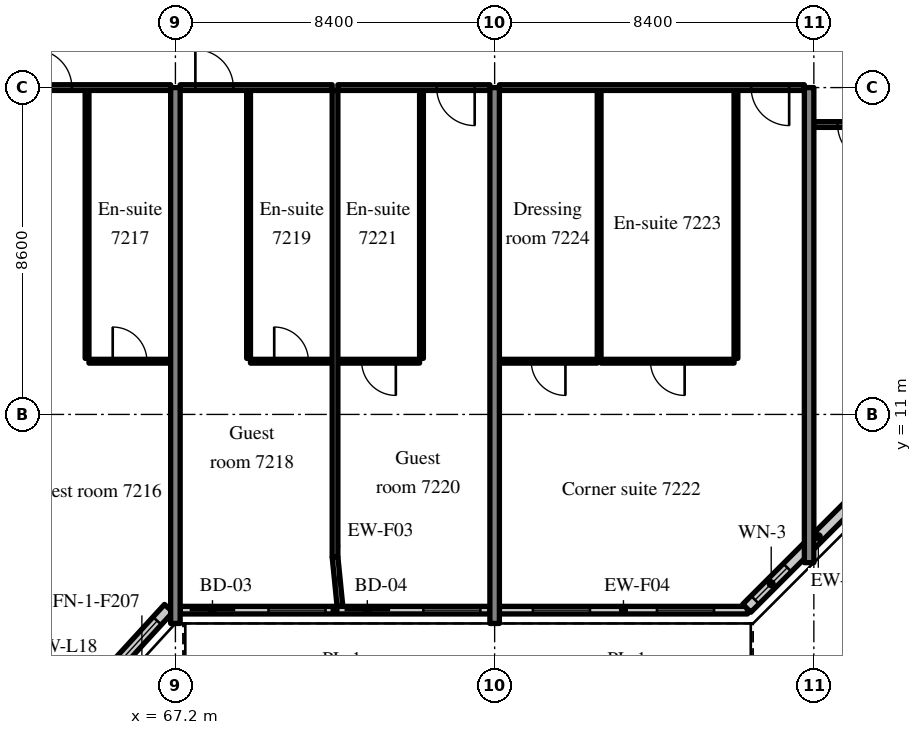
"""IFC4 building model, lengths in metres.
Left out: names, types, materials, properties, quantities, classifications, styles, units other than length and angle.
Written with IfcOpenShell. Run it as: python <this file> out.ifc"""

import sys

from ifc_helpers import new_model, si_unit, direction, frame, frame_2d, origin, place, context, subcontext, project, spatial, rectangle, extrude, source, transform, mapped, element, fill, save


model = new_model("IFC4")
c1 = context("Model", 3, precision=1e-05, world=origin(), true_north=direction((0.0, 1.0)))
c2 = subcontext(c1, "Body", "Model", "MODEL_VIEW")
j1 = project(units=[si_unit("LENGTHUNIT", "METRE"), si_unit("PLANEANGLEUNIT", "RADIAN")], contexts=[c1])
p1 = place(None, origin())
s1 = spatial("IfcSite", under=j1, at=p1, CompositionType="ELEMENT")
p2 = place(p1, origin())
s2 = spatial("IfcBuilding", under=s1, at=p2, CompositionType="ELEMENT")
p3 = place(p2, frame((0.0, 0.0, 301.7)))
s3 = spatial("IfcBuildingStorey", under=s2, at=p3, CompositionType="ELEMENT", Elevation=301.7)
m1 = source(origin(), c2, "Body", "SweptSolid", [
    extrude(rectangle(XDim=14.1, YDim=0.25, at=frame_2d((7.05, 0.0))), origin(), (0.0, 0.0, 1.0), 3.72),
])
for number, where, z_axis, x_axis in (
    (1, (67.2, 5.5, 0.0), (0.0, 0.0, 1.0), (0.0, 1.0, 0.0)),
    (2, (75.6, 5.5, 0.0), (0.0, 0.0, 1.0), (0.0, 1.0, 0.0)),
):
    element("IfcWall", number, at=place(p3, frame(where, z_axis=z_axis, x_axis=x_axis)), inside=s3, PredefinedType="SHEAR", context=c2, shape_type="MappedRepresentation", body=[
        mapped(m1, transform((0.0, 0.0, 0.0), scale=1.0)),
    ])
m2 = source(origin(), c2, "Body", "SweptSolid", [
    extrude(rectangle(XDim=12.5, YDim=0.25, at=frame_2d((6.25, 0.0))), origin(), (0.0, 0.0, 1.0), 3.72),
])
p4 = place(p3, frame((83.875, 7.1, 0.0), z_axis=(0.0, 0.0, 1.0), x_axis=(0.0, 1.0, 0.0)))
e3 = element("IfcWall", 3, at=p4, inside=s3, PredefinedType="SHEAR", context=c2, shape_type="MappedRepresentation", body=[
    mapped(m2, transform((0.0, 0.0, 0.0), scale=1.0)),
])
m3 = source(origin(), c2, "Body", "SweptSolid", [
    extrude(rectangle(XDim=2.398, YDim=0.3, at=frame_2d((1.199, 0.0))), origin(), (0.0, 0.0, 1.0), 3.72),
])
p5 = place(p3, frame((65.404, 4.131, 0.0), z_axis=(0.0, 0.0, 1.0), x_axis=(0.675374189419, 0.737475222815, 0.0)))
e4 = element("IfcWall", 4, at=p5, inside=s3, PredefinedType="SOLIDWALL", context=c2, shape_type="MappedRepresentation", body=[
    mapped(m3, transform((0.0, 0.0, 0.0), scale=1.0)),
])
m4 = source(origin(), c2, "Body", "SweptSolid", [
    extrude(rectangle(XDim=1.5, YDim=2.0, at=frame_2d((0.75, 1.0))), frame((0.0, 0.16, 0.0), z_axis=(0.0, -1.0, 0.0), x_axis=(1.0, 0.0, 0.0)), (0.0, 0.0, 1.0), 0.32),
])
p6 = place(p5, frame((0.449, 0.0, 0.9)))
e5 = element("IfcOpeningElement", 5, at=p6, cuts=e4, PredefinedType="OPENING", context=c2, shape_type="MappedRepresentation", body=[
    mapped(m4, transform((0.0, 0.0, 0.0), scale=1.0)),
])
m5 = source(origin(), c2, "Body", "SweptSolid", [
    extrude(rectangle(XDim=8.15, YDim=0.2, at=frame_2d((4.075, 0.0))), origin(), (0.0, 0.0, 1.0), 3.17),
])
p7 = place(p3, frame((67.325, 5.85, 0.0), z_axis=(0.0, 0.0, 1.0), x_axis=(1.0, 0.0, 0.0)))
e6 = element("IfcWall", 6, at=p7, inside=s3, PredefinedType="SOLIDWALL", context=c2, shape_type="MappedRepresentation", body=[
    mapped(m5, transform((0.0, 0.0, 0.0), scale=1.0)),
])
m6 = source(origin(), c2, "Body", "SweptSolid", [
    extrude(rectangle(XDim=1.2, YDim=2.4, at=frame_2d((0.6, 1.2))), frame((0.0, 0.11, 0.0), z_axis=(0.0, -1.0, 0.0), x_axis=(1.0, 0.0, 0.0)), (0.0, 0.0, 1.0), 0.22),
])
p8 = place(p7, frame((0.25, 0.0, 0.0)))
e7 = element("IfcOpeningElement", 7, at=p8, cuts=e6, PredefinedType="OPENING", context=c2, shape_type="MappedRepresentation", body=[
    mapped(m6, transform((0.0, 0.0, 0.0), scale=1.0)),
])
m7 = source(origin(), c2, "Body", "SweptSolid", [
    extrude(rectangle(XDim=1.5, YDim=1.5, at=frame_2d((0.75, 0.75))), frame((0.0, 0.11, 0.0), z_axis=(0.0, -1.0, 0.0), x_axis=(1.0, 0.0, 0.0)), (0.0, 0.0, 1.0), 0.22),
])
p9 = place(p7, frame((2.325, 0.0, 0.9)))
e8 = element("IfcOpeningElement", 8, at=p9, cuts=e6, PredefinedType="OPENING", context=c2, shape_type="MappedRepresentation", body=[
    mapped(m7, transform((0.0, 0.0, 0.0), scale=1.0)),
])
p10 = place(p7, frame((4.325, 0.0, 0.0)))
e9 = element("IfcOpeningElement", 9, at=p10, cuts=e6, PredefinedType="OPENING", context=c2, shape_type="MappedRepresentation", body=[
    mapped(m6, transform((0.0, 0.0, 0.0), scale=1.0)),
])
p11 = place(p7, frame((6.4, 0.0, 0.9)))
e10 = element("IfcOpeningElement", 10, at=p11, cuts=e6, PredefinedType="OPENING", context=c2, shape_type="MappedRepresentation", body=[
    mapped(m7, transform((0.0, 0.0, 0.0), scale=1.0)),
])
m8 = source(origin(), c2, "Body", "SweptSolid", [
    extrude(rectangle(XDim=6.53, YDim=0.2, at=frame_2d((3.265, 0.0))), origin(), (0.0, 0.0, 1.0), 3.17),
])
p12 = place(p3, frame((75.725, 5.85, 0.0), z_axis=(0.0, 0.0, 1.0), x_axis=(1.0, 0.0, 0.0)))
e11 = element("IfcWall", 11, at=p12, inside=s3, PredefinedType="SOLIDWALL", context=c2, shape_type="MappedRepresentation", body=[
    mapped(m8, transform((0.0, 0.0, 0.0), scale=1.0)),
])
p13 = place(p12, frame((0.883, 0.0, 0.9)))
e12 = element("IfcOpeningElement", 12, at=p13, cuts=e11, PredefinedType="OPENING", context=c2, shape_type="MappedRepresentation", body=[
    mapped(m7, transform((0.0, 0.0, 0.0), scale=1.0)),
])
p14 = place(p12, frame((4.147, 0.0, 0.9)))
e13 = element("IfcOpeningElement", 13, at=p14, cuts=e11, PredefinedType="OPENING", context=c2, shape_type="MappedRepresentation", body=[
    mapped(m7, transform((0.0, 0.0, 0.0), scale=1.0)),
])
m9 = source(origin(), c2, "Body", "SweptSolid", [
    extrude(rectangle(XDim=5.326, YDim=0.3, at=frame_2d((2.663, 0.0))), origin(), (0.0, 0.0, 1.0), 3.72),
])
p15 = place(p3, frame((82.234, 5.9, 0.0), z_axis=(0.0, 0.0, 1.0), x_axis=(0.707083859269, 0.707129702361, 0.0)))
e14 = element("IfcWall", 14, at=p15, inside=s3, PredefinedType="SOLIDWALL", context=c2, shape_type="MappedRepresentation", body=[
    mapped(m9, transform((0.0, 0.0, 0.0), scale=1.0)),
])
m10 = source(origin(), c2, "Body", "SweptSolid", [
    extrude(rectangle(XDim=1.2, YDim=1.5, at=frame_2d((0.6, 0.75))), frame((0.0, 0.16, 0.0), z_axis=(0.0, -1.0, 0.0), x_axis=(1.0, 0.0, 0.0)), (0.0, 0.0, 1.0), 0.32),
])
p16 = place(p15, frame((0.31, 0.0, 0.9)))
e15 = element("IfcOpeningElement", 15, at=p16, cuts=e14, PredefinedType="OPENING", context=c2, shape_type="MappedRepresentation", body=[
    mapped(m10, transform((0.0, 0.0, 0.0), scale=1.0)),
])
m11 = source(origin(), c2, "Body", "SweptSolid", [
    extrude(rectangle(XDim=7.05, YDim=0.1, at=frame_2d((3.525, 0.0))), origin(), (0.0, 0.0, 1.0), 3.72),
])
p17 = place(p3, frame((64.875, 12.475, 0.0), z_axis=(0.0, 0.0, 1.0), x_axis=(0.0, 1.0, 0.0)))
e16 = element("IfcWall", 16, at=p17, inside=s3, PredefinedType="PARTITIONING", context=c2, shape_type="MappedRepresentation", body=[
    mapped(m11, transform((0.0, 0.0, 0.0), scale=1.0)),
])
m12 = source(origin(), c2, "Body", "SweptSolid", [
    extrude(rectangle(XDim=2.15, YDim=0.1, at=frame_2d((1.075, 0.0))), origin(), (0.0, 0.0, 1.0), 3.72),
])
p18 = place(p3, frame((64.925, 12.4, 0.0), z_axis=(0.0, 0.0, 1.0), x_axis=(1.0, 0.0, 0.0)))
e17 = element("IfcWall", 17, at=p18, inside=s3, PredefinedType="PARTITIONING", context=c2, shape_type="MappedRepresentation", body=[
    mapped(m12, transform((0.0, 0.0, 0.0), scale=1.0)),
])
m13 = source(origin(), c2, "Body", "SweptSolid", [
    extrude(rectangle(XDim=0.9, YDim=2.1, at=frame_2d((0.45, 1.05))), frame((0.0, 0.06, 0.0), z_axis=(0.0, -1.0, 0.0), x_axis=(1.0, 0.0, 0.0)), (0.0, 0.0, 1.0), 0.12),
])
p19 = place(p18, frame((0.625, 0.0, 0.0)))
e18 = element("IfcOpeningElement", 18, at=p19, cuts=e17, PredefinedType="OPENING", context=c2, shape_type="MappedRepresentation", body=[
    mapped(m13, transform((0.0, 0.0, 0.0), scale=1.0)),
])
m14 = source(origin(), c2, "Body", "SweptSolid", [
    extrude(rectangle(XDim=4.0, YDim=0.15, at=frame_2d((2.0, 0.0))), origin(), (0.0, 0.0, 1.0), 3.02),
])
p20 = place(p3, frame((63.075, 19.6, 0.0), z_axis=(0.0, 0.0, 1.0), x_axis=(1.0, 0.0, 0.0)))
e19 = element("IfcWall", 19, at=p20, inside=s3, PredefinedType="PARTITIONING", context=c2, shape_type="MappedRepresentation", body=[
    mapped(m14, transform((0.0, 0.0, 0.0), scale=1.0)),
])
m15 = source(origin(), c2, "Body", "SweptSolid", [
    extrude(rectangle(XDim=1.0, YDim=2.1, at=frame_2d((0.5, 1.05))), frame((0.0, 0.085, 0.0), z_axis=(0.0, -1.0, 0.0), x_axis=(1.0, 0.0, 0.0)), (0.0, 0.0, 1.0), 0.17),
])
p21 = place(p20, frame((0.4, 0.0, 0.0)))
e20 = element("IfcOpeningElement", 20, at=p21, cuts=e19, PredefinedType="OPENING", context=c2, shape_type="MappedRepresentation", body=[
    mapped(m15, transform((0.0, 0.0, 0.0), scale=1.0)),
])
p22 = place(p3, frame((69.125, 12.475, 0.0), z_axis=(0.0, 0.0, 1.0), x_axis=(0.0, 1.0, 0.0)))
e21 = element("IfcWall", 21, at=p22, inside=s3, PredefinedType="PARTITIONING", context=c2, shape_type="MappedRepresentation", body=[
    mapped(m11, transform((0.0, 0.0, 0.0), scale=1.0)),
])
p23 = place(p3, frame((69.175, 12.4, 0.0), z_axis=(0.0, 0.0, 1.0), x_axis=(1.0, 0.0, 0.0)))
e22 = element("IfcWall", 22, at=p23, inside=s3, PredefinedType="PARTITIONING", context=c2, shape_type="MappedRepresentation", body=[
    mapped(m12, transform((0.0, 0.0, 0.0), scale=1.0)),
])
p24 = place(p23, frame((0.625, 0.0, 0.0)))
e23 = element("IfcOpeningElement", 23, at=p24, cuts=e22, PredefinedType="OPENING", context=c2, shape_type="MappedRepresentation", body=[
    mapped(m13, transform((0.0, 0.0, 0.0), scale=1.0)),
])
p25 = place(p3, frame((67.325, 19.6, 0.0), z_axis=(0.0, 0.0, 1.0), x_axis=(1.0, 0.0, 0.0)))
e24 = element("IfcWall", 24, at=p25, inside=s3, PredefinedType="PARTITIONING", context=c2, shape_type="MappedRepresentation", body=[
    mapped(m14, transform((0.0, 0.0, 0.0), scale=1.0)),
])
p26 = place(p25, frame((0.4, 0.0, 0.0)))
e25 = element("IfcOpeningElement", 25, at=p26, cuts=e24, PredefinedType="OPENING", context=c2, shape_type="MappedRepresentation", body=[
    mapped(m15, transform((0.0, 0.0, 0.0), scale=1.0)),
])
p27 = place(p3, frame((73.675, 12.475, 0.0), z_axis=(0.0, 0.0, 1.0), x_axis=(0.0, 1.0, 0.0)))
e26 = element("IfcWall", 26, at=p27, inside=s3, PredefinedType="PARTITIONING", context=c2, shape_type="MappedRepresentation", body=[
    mapped(m11, transform((0.0, 0.0, 0.0), scale=1.0)),
])
p28 = place(p3, frame((71.475, 12.4, 0.0), z_axis=(0.0, 0.0, 1.0), x_axis=(1.0, 0.0, 0.0)))
e27 = element("IfcWall", 27, at=p28, inside=s3, PredefinedType="PARTITIONING", context=c2, shape_type="MappedRepresentation", body=[
    mapped(m12, transform((0.0, 0.0, 0.0), scale=1.0)),
])
p29 = place(p28, frame((0.625, 0.0, 0.0)))
e28 = element("IfcOpeningElement", 28, at=p29, cuts=e27, PredefinedType="OPENING", context=c2, shape_type="MappedRepresentation", body=[
    mapped(m13, transform((0.0, 0.0, 0.0), scale=1.0)),
])
p30 = place(p3, frame((71.475, 19.6, 0.0), z_axis=(0.0, 0.0, 1.0), x_axis=(1.0, 0.0, 0.0)))
e29 = element("IfcWall", 29, at=p30, inside=s3, PredefinedType="PARTITIONING", context=c2, shape_type="MappedRepresentation", body=[
    mapped(m14, transform((0.0, 0.0, 0.0), scale=1.0)),
])
p31 = place(p30, frame((2.6, 0.0, 0.0)))
e30 = element("IfcOpeningElement", 30, at=p31, cuts=e29, PredefinedType="OPENING", context=c2, shape_type="MappedRepresentation", body=[
    mapped(m15, transform((0.0, 0.0, 0.0), scale=1.0)),
])
m16 = source(origin(), c2, "Body", "SweptSolid", [
    extrude(rectangle(XDim=12.275, YDim=0.15, at=frame_2d((6.137, 0.0))), origin(), (0.0, 0.0, 1.0), 3.72),
])
p32 = place(p3, frame((71.4, 7.25, 0.0), z_axis=(0.0, 0.0, 1.0), x_axis=(0.0, 1.0, 0.0)))
e31 = element("IfcWall", 31, at=p32, inside=s3, PredefinedType="PARTITIONING", context=c2, shape_type="MappedRepresentation", body=[
    mapped(m16, transform((0.0, 0.0, 0.0), scale=1.0)),
])
for number, where, z_axis, x_axis in (
    (32, (81.95, 12.475, 0.0), (0.0, 0.0, 1.0), (0.0, 1.0, 0.0)),
    (33, (78.35, 12.475, 0.0), (0.0, 0.0, 1.0), (0.0, 1.0, 0.0)),
):
    element("IfcWall", number, at=place(p3, frame(where, z_axis=z_axis, x_axis=x_axis)), inside=s3, PredefinedType="PARTITIONING", context=c2, shape_type="MappedRepresentation", body=[
        mapped(m11, transform((0.0, 0.0, 0.0), scale=1.0)),
    ])
m17 = source(origin(), c2, "Body", "SweptSolid", [
    extrude(rectangle(XDim=3.5, YDim=0.1, at=frame_2d((1.75, 0.0))), origin(), (0.0, 0.0, 1.0), 3.72),
])
p33 = place(p3, frame((78.4, 12.4, 0.0), z_axis=(0.0, 0.0, 1.0), x_axis=(1.0, 0.0, 0.0)))
e34 = element("IfcWall", 34, at=p33, inside=s3, PredefinedType="PARTITIONING", context=c2, shape_type="MappedRepresentation", body=[
    mapped(m17, transform((0.0, 0.0, 0.0), scale=1.0)),
])
p34 = place(p33, frame((1.3, 0.0, 0.0)))
e35 = element("IfcOpeningElement", 35, at=p34, cuts=e34, PredefinedType="OPENING", context=c2, shape_type="MappedRepresentation", body=[
    mapped(m13, transform((0.0, 0.0, 0.0), scale=1.0)),
])
m18 = source(origin(), c2, "Body", "SweptSolid", [
    extrude(rectangle(XDim=2.575, YDim=0.1, at=frame_2d((1.288, 0.0))), origin(), (0.0, 0.0, 1.0), 3.72),
])
p35 = place(p3, frame((75.725, 12.4, 0.0), z_axis=(0.0, 0.0, 1.0), x_axis=(1.0, 0.0, 0.0)))
e36 = element("IfcWall", 36, at=p35, inside=s3, PredefinedType="PARTITIONING", context=c2, shape_type="MappedRepresentation", body=[
    mapped(m18, transform((0.0, 0.0, 0.0), scale=1.0)),
])
p36 = place(p35, frame((0.838, 0.0, 0.0)))
e37 = element("IfcOpeningElement", 37, at=p36, cuts=e36, PredefinedType="OPENING", context=c2, shape_type="MappedRepresentation", body=[
    mapped(m13, transform((0.0, 0.0, 0.0), scale=1.0)),
])
m19 = source(origin(), c2, "Body", "SweptSolid", [
    extrude(rectangle(XDim=8.025, YDim=0.15, at=frame_2d((4.012, 0.0))), origin(), (0.0, 0.0, 1.0), 3.02),
])
p37 = place(p3, frame((75.725, 19.6, 0.0), z_axis=(0.0, 0.0, 1.0), x_axis=(1.0, 0.0, 0.0)))
e38 = element("IfcWall", 38, at=p37, inside=s3, PredefinedType="PARTITIONING", context=c2, shape_type="MappedRepresentation", body=[
    mapped(m19, transform((0.0, 0.0, 0.0), scale=1.0)),
])
p38 = place(p37, frame((6.625, 0.0, 0.0)))
e39 = element("IfcOpeningElement", 39, at=p38, cuts=e38, PredefinedType="OPENING", context=c2, shape_type="MappedRepresentation", body=[
    mapped(m15, transform((0.0, 0.0, 0.0), scale=1.0)),
])
m20 = source(origin(), c2, "Body", "SweptSolid", [
    extrude(rectangle(XDim=1.9, YDim=0.15, at=frame_2d((0.95, 0.0))), origin(), (0.0, 0.0, 1.0), 3.02),
])
p39 = place(p3, frame((84.0, 18.628, 0.0), z_axis=(0.0, 0.0, 1.0), x_axis=(1.0, 0.0, 0.0)))
e40 = element("IfcWall", 40, at=p39, inside=s3, PredefinedType="PARTITIONING", context=c2, shape_type="MappedRepresentation", body=[
    mapped(m20, transform((0.0, 0.0, 0.0), scale=1.0)),
])
p40 = place(p39, frame((0.625, 0.0, 0.0)))
e41 = element("IfcOpeningElement", 41, at=p40, cuts=e40, PredefinedType="OPENING", context=c2, shape_type="MappedRepresentation", body=[
    mapped(m15, transform((0.0, 0.0, 0.0), scale=1.0)),
])
m21 = source(origin(), c2, "Body", "SweptSolid", [
    extrude(rectangle(XDim=1.307, YDim=0.15, at=frame_2d((0.653, 0.0))), origin(), (0.0, 0.0, 1.0), 3.72),
])
p41 = place(p3, frame((71.53, 5.95, 0.0), z_axis=(0.0, 0.0, 1.0), x_axis=(-0.099596223396, 0.99502793543, 0.0)))
e42 = element("IfcWall", 42, at=p41, inside=s3, PredefinedType="PARTITIONING", context=c2, shape_type="MappedRepresentation", body=[
    mapped(m21, transform((0.0, 0.0, 0.0), scale=1.0)),
])
m22 = source(origin(), c2, "Body", "SweptSolid", [
    extrude(rectangle(XDim=1.5, YDim=2.0, at=frame_2d((0.75, 1.0))), frame((0.0, 0.03, 0.0), z_axis=(0.0, -1.0, 0.0), x_axis=(1.0, 0.0, 0.0)), (0.0, 0.0, 1.0), 0.06),
])
p42 = place(p6, origin())
e43 = element("IfcWindow", 43, at=p42, inside=s3, PartitioningType="SINGLE_PANEL", PredefinedType="WINDOW", context=c2, shape_type="MappedRepresentation", body=[
    mapped(m22, transform((0.0, 0.0, 0.0), scale=1.0)),
])
fill(e5, e43)
m23 = source(origin(), c2, "Body", "SweptSolid", [
    extrude(rectangle(XDim=1.2, YDim=2.4, at=frame_2d((0.6, 1.2))), frame((0.0, 0.025, 0.0), z_axis=(0.0, -1.0, 0.0), x_axis=(1.0, 0.0, 0.0)), (0.0, 0.0, 1.0), 0.05),
])
p43 = place(p8, origin())
e44 = element("IfcDoor", 44, at=p43, inside=s3, OperationType="SLIDING_TO_LEFT", PredefinedType="DOOR", context=c2, shape_type="MappedRepresentation", body=[
    mapped(m23, transform((0.0, 0.0, 0.0), scale=1.0)),
])
fill(e7, e44)
m24 = source(origin(), c2, "Body", "SweptSolid", [
    extrude(rectangle(XDim=1.5, YDim=1.5, at=frame_2d((0.75, 0.75))), frame((0.0, 0.03, 0.0), z_axis=(0.0, -1.0, 0.0), x_axis=(1.0, 0.0, 0.0)), (0.0, 0.0, 1.0), 0.06),
])
p44 = place(p9, origin())
e45 = element("IfcWindow", 45, at=p44, inside=s3, PartitioningType="SINGLE_PANEL", PredefinedType="WINDOW", context=c2, shape_type="MappedRepresentation", body=[
    mapped(m24, transform((0.0, 0.0, 0.0), scale=1.0)),
])
fill(e8, e45)
p45 = place(p10, origin())
e46 = element("IfcDoor", 46, at=p45, inside=s3, OperationType="SLIDING_TO_RIGHT", PredefinedType="DOOR", context=c2, shape_type="MappedRepresentation", body=[
    mapped(m23, transform((0.0, 0.0, 0.0), scale=1.0)),
])
fill(e9, e46)
p46 = place(p11, origin())
e47 = element("IfcWindow", 47, at=p46, inside=s3, PartitioningType="SINGLE_PANEL", PredefinedType="WINDOW", context=c2, shape_type="MappedRepresentation", body=[
    mapped(m24, transform((0.0, 0.0, 0.0), scale=1.0)),
])
fill(e10, e47)
p47 = place(p13, origin())
e48 = element("IfcWindow", 48, at=p47, inside=s3, PartitioningType="SINGLE_PANEL", PredefinedType="WINDOW", context=c2, shape_type="MappedRepresentation", body=[
    mapped(m24, transform((0.0, 0.0, 0.0), scale=1.0)),
])
fill(e12, e48)
p48 = place(p14, origin())
e49 = element("IfcWindow", 49, at=p48, inside=s3, PartitioningType="SINGLE_PANEL", PredefinedType="WINDOW", context=c2, shape_type="MappedRepresentation", body=[
    mapped(m24, transform((0.0, 0.0, 0.0), scale=1.0)),
])
fill(e13, e49)
m25 = source(origin(), c2, "Body", "SweptSolid", [
    extrude(rectangle(XDim=1.2, YDim=1.5, at=frame_2d((0.6, 0.75))), frame((0.0, 0.03, 0.0), z_axis=(0.0, -1.0, 0.0), x_axis=(1.0, 0.0, 0.0)), (0.0, 0.0, 1.0), 0.06),
])
p49 = place(p16, origin())
e50 = element("IfcWindow", 50, at=p49, inside=s3, PartitioningType="SINGLE_PANEL", PredefinedType="WINDOW", context=c2, shape_type="MappedRepresentation", body=[
    mapped(m25, transform((0.0, 0.0, 0.0), scale=1.0)),
])
fill(e15, e50)
m26 = source(origin(), c2, "Body", "SweptSolid", [
    extrude(rectangle(XDim=0.9, YDim=2.1, at=frame_2d((0.45, 1.05))), frame((0.0, 0.025, 0.0), z_axis=(0.0, -1.0, 0.0), x_axis=(1.0, 0.0, 0.0)), (0.0, 0.0, 1.0), 0.05),
])
p50 = place(p19, origin())
e51 = element("IfcDoor", 51, at=p50, inside=s3, OperationType="SINGLE_SWING_LEFT", PredefinedType="DOOR", context=c2, shape_type="MappedRepresentation", body=[
    mapped(m26, transform((0.0, 0.0, 0.0), scale=1.0)),
])
fill(e18, e51)
m27 = source(origin(), c2, "Body", "SweptSolid", [
    extrude(rectangle(XDim=1.0, YDim=2.1, at=frame_2d((0.5, 1.05))), frame((0.0, 0.025, 0.0), z_axis=(0.0, -1.0, 0.0), x_axis=(1.0, 0.0, 0.0)), (0.0, 0.0, 1.0), 0.05),
])
p51 = place(p21, origin())
e52 = element("IfcDoor", 52, at=p51, inside=s3, OperationType="SINGLE_SWING_LEFT", PredefinedType="DOOR", context=c2, shape_type="MappedRepresentation", body=[
    mapped(m27, transform((0.0, 0.0, 0.0), scale=1.0)),
])
fill(e20, e52)
p52 = place(p24, origin())
e53 = element("IfcDoor", 53, at=p52, inside=s3, OperationType="SINGLE_SWING_LEFT", PredefinedType="DOOR", context=c2, shape_type="MappedRepresentation", body=[
    mapped(m26, transform((0.0, 0.0, 0.0), scale=1.0)),
])
fill(e23, e53)
p53 = place(p26, origin())
e54 = element("IfcDoor", 54, at=p53, inside=s3, OperationType="SINGLE_SWING_LEFT", PredefinedType="DOOR", context=c2, shape_type="MappedRepresentation", body=[
    mapped(m27, transform((0.0, 0.0, 0.0), scale=1.0)),
])
fill(e25, e54)
p54 = place(p29, origin())
e55 = element("IfcDoor", 55, at=p54, inside=s3, OperationType="SINGLE_SWING_RIGHT", PredefinedType="DOOR", context=c2, shape_type="MappedRepresentation", body=[
    mapped(m26, transform((0.0, 0.0, 0.0), scale=1.0)),
])
fill(e28, e55)
p55 = place(p31, origin())
e56 = element("IfcDoor", 56, at=p55, inside=s3, OperationType="SINGLE_SWING_RIGHT", PredefinedType="DOOR", context=c2, shape_type="MappedRepresentation", body=[
    mapped(m27, transform((0.0, 0.0, 0.0), scale=1.0)),
])
fill(e30, e56)
p56 = place(p34, origin())
e57 = element("IfcDoor", 57, at=p56, inside=s3, OperationType="SINGLE_SWING_RIGHT", PredefinedType="DOOR", context=c2, shape_type="MappedRepresentation", body=[
    mapped(m26, transform((0.0, 0.0, 0.0), scale=1.0)),
])
fill(e35, e57)
p57 = place(p36, origin())
e58 = element("IfcDoor", 58, at=p57, inside=s3, OperationType="SINGLE_SWING_RIGHT", PredefinedType="DOOR", context=c2, shape_type="MappedRepresentation", body=[
    mapped(m26, transform((0.0, 0.0, 0.0), scale=1.0)),
])
fill(e37, e58)
p58 = place(p38, origin())
e59 = element("IfcDoor", 59, at=p58, inside=s3, OperationType="SINGLE_SWING_RIGHT", PredefinedType="DOOR", context=c2, shape_type="MappedRepresentation", body=[
    mapped(m27, transform((0.0, 0.0, 0.0), scale=1.0)),
])
fill(e39, e59)
p59 = place(p40, origin())
e60 = element("IfcDoor", 60, at=p59, inside=s3, OperationType="SINGLE_SWING_RIGHT", PredefinedType="DOOR", context=c2, shape_type="MappedRepresentation", body=[
    mapped(m27, transform((0.0, 0.0, 0.0), scale=1.0)),
])
fill(e41, e60)
save(model, sys.argv[1])
